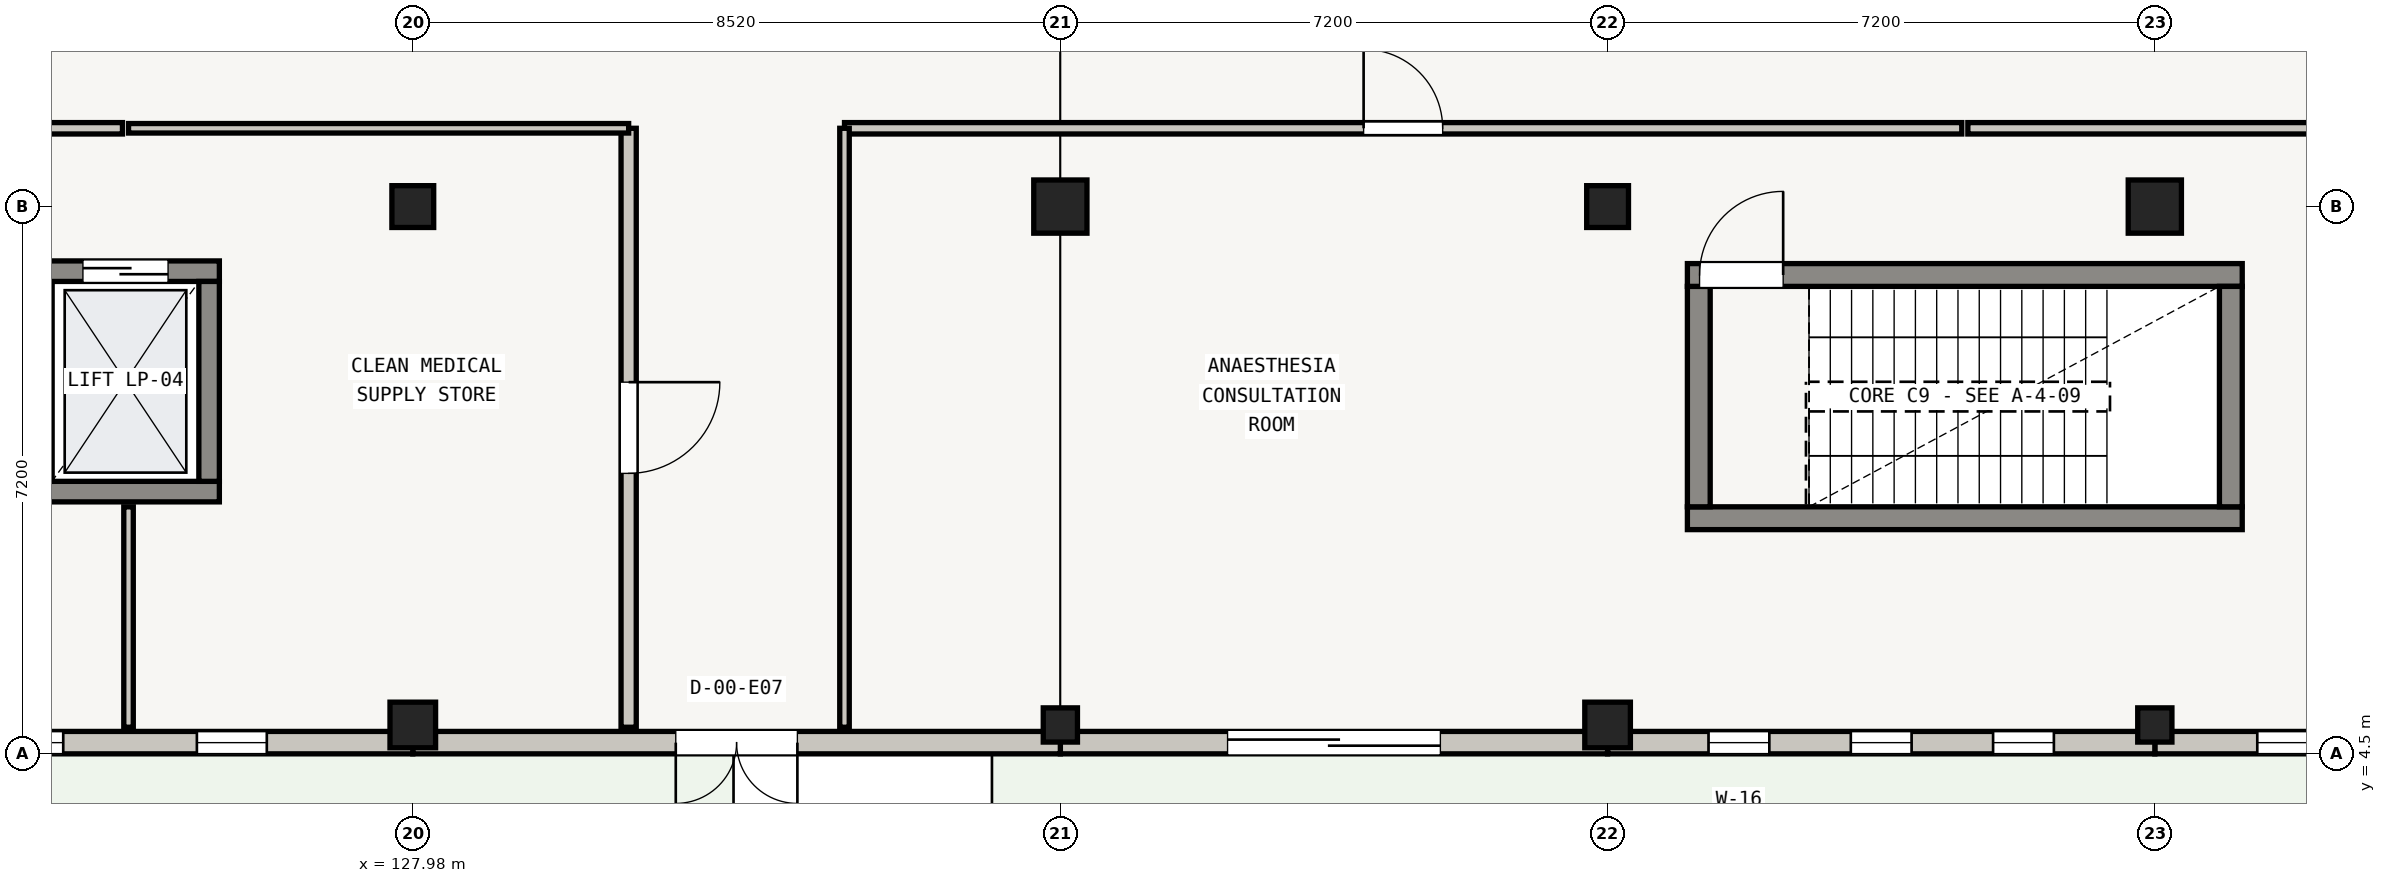
"""IFC4 building model, lengths in metres.
Left out: names, types, materials, properties, quantities, classifications, styles, units other than length and angle.
Written with IfcOpenShell. Run it as: python <this file> out.ifc"""

import sys

from ifc_helpers import new_model, si_unit, direction, frame, frame_2d, origin, origin_2d, place, context, subcontext, project, spatial, rectangle, extrude, element, fill, save


model = new_model("IFC4")
c1 = context("Model", 3, precision=1e-05, world=origin(), true_north=direction((0.0, 1.0)))
c2 = subcontext(c1, "Body", "Model", "MODEL_VIEW")
j1 = project(units=[si_unit("LENGTHUNIT", "METRE"), si_unit("PLANEANGLEUNIT", "RADIAN")], contexts=[c1])
p1 = place(None, origin())
s1 = spatial("IfcSite", under=j1, at=p1, CompositionType="ELEMENT")
p2 = place(p1, origin())
s2 = spatial("IfcBuilding", under=s1, at=p2, CompositionType="ELEMENT")
p3 = place(p2, origin())
s3 = spatial("IfcBuildingStorey", under=s2, at=p3, CompositionType="ELEMENT", Elevation=0.0)
p4 = place(p3, frame((127.98, 4.88, 0.0), z_axis=(0.0, 0.0, 1.0), x_axis=(1.0, 0.0, 0.0)))
e1 = element("IfcColumn", 1, at=p4, inside=s3, PredefinedType="COLUMN", context=c2, shape_type="SweptSolid", body=[
    extrude(rectangle(XDim=0.6, YDim=0.6, at=origin_2d()), origin(), (0.0, 0.0, 1.0), 4.205),
])
p5 = place(p3, frame((127.98, 11.7, 0.0), z_axis=(0.0, 0.0, 1.0), x_axis=(1.0, 0.0, 0.0)))
e2 = element("IfcColumn", 2, at=p5, inside=s3, PredefinedType="COLUMN", context=c2, shape_type="SweptSolid", body=[
    extrude(rectangle(XDim=0.55, YDim=0.55, at=origin_2d()), origin(), (0.0, 0.0, 1.0), 4.205),
])
p6 = place(p3, frame((136.5, 4.88, 0.0), z_axis=(0.0, 0.0, 1.0), x_axis=(1.0, 0.0, 0.0)))
e3 = element("IfcColumn", 3, at=p6, inside=s3, PredefinedType="COLUMN", context=c2, shape_type="SweptSolid", body=[
    extrude(rectangle(XDim=0.45, YDim=0.45, at=origin_2d()), origin(), (0.0, 0.0, 1.0), 4.205),
])
p7 = place(p3, frame((136.5, 11.7, 0.0), z_axis=(0.0, 0.0, 1.0), x_axis=(1.0, 0.0, 0.0)))
e4 = element("IfcColumn", 4, at=p7, inside=s3, PredefinedType="COLUMN", context=c2, shape_type="SweptSolid", body=[
    extrude(rectangle(XDim=0.7, YDim=0.7, at=origin_2d()), origin(), (0.0, 0.0, 1.0), 4.205),
])
p8 = place(p3, frame((143.7, 4.88, 0.0), z_axis=(0.0, 0.0, 1.0), x_axis=(1.0, 0.0, 0.0)))
e5 = element("IfcColumn", 5, at=p8, inside=s3, PredefinedType="COLUMN", context=c2, shape_type="SweptSolid", body=[
    extrude(rectangle(XDim=0.6, YDim=0.6, at=origin_2d()), origin(), (0.0, 0.0, 1.0), 4.205),
])
p9 = place(p3, frame((143.7, 11.7, 0.0), z_axis=(0.0, 0.0, 1.0), x_axis=(1.0, 0.0, 0.0)))
e6 = element("IfcColumn", 6, at=p9, inside=s3, PredefinedType="COLUMN", context=c2, shape_type="SweptSolid", body=[
    extrude(rectangle(XDim=0.55, YDim=0.55, at=origin_2d()), origin(), (0.0, 0.0, 1.0), 4.205),
])
p10 = place(p3, frame((150.9, 4.88, 0.0), z_axis=(0.0, 0.0, 1.0), x_axis=(1.0, 0.0, 0.0)))
e7 = element("IfcColumn", 7, at=p10, inside=s3, PredefinedType="COLUMN", context=c2, shape_type="SweptSolid", body=[
    extrude(rectangle(XDim=0.45, YDim=0.45, at=origin_2d()), origin(), (0.0, 0.0, 1.0), 4.205),
])
p11 = place(p3, frame((150.9, 11.7, 0.0), z_axis=(0.0, 0.0, 1.0), x_axis=(1.0, 0.0, 0.0)))
e8 = element("IfcColumn", 8, at=p11, inside=s3, PredefinedType="COLUMN", context=c2, shape_type="SweptSolid", body=[
    extrude(rectangle(XDim=0.7, YDim=0.7, at=origin_2d()), origin(), (0.0, 0.0, 1.0), 4.205),
])
p12 = place(p3, frame((158.1, 4.647, 0.0), z_axis=(0.0, 0.0, 1.0), x_axis=(-1.0, 0.0, 0.0)))
e9 = element("IfcWall", 9, at=p12, inside=s3, PredefinedType="STANDARD", context=c2, shape_type="SweptSolid", body=[
    extrude(rectangle(XDim=7.2, YDim=0.295, at=frame_2d((3.6, 0.0))), origin(), (0.0, 0.0, 1.0), 3.59),
])
p13 = place(p12, frame((1.348, 0.0, 0.55)))
e10 = element("IfcOpeningElement", 10, at=p13, cuts=e9, PredefinedType="OPENING", context=c2, shape_type="SweptSolid", body=[
    extrude(rectangle(XDim=0.76, YDim=2.16, at=frame_2d((0.38, 1.08))), frame((0.0, 0.147, 0.0), z_axis=(0.0, -1.0, 0.0), x_axis=(1.0, 0.0, 0.0)), (0.0, 0.0, 1.0), 0.295),
])
p14 = place(p12, frame((3.22, 0.0, 0.55)))
e11 = element("IfcOpeningElement", 11, at=p14, cuts=e9, PredefinedType="OPENING", context=c2, shape_type="SweptSolid", body=[
    extrude(rectangle(XDim=0.76, YDim=2.16, at=frame_2d((0.38, 1.08))), frame((0.0, 0.147, 0.0), z_axis=(0.0, -1.0, 0.0), x_axis=(1.0, 0.0, 0.0)), (0.0, 0.0, 1.0), 0.295),
])
p15 = place(p12, frame((5.092, 0.0, 0.55)))
e12 = element("IfcOpeningElement", 12, at=p15, cuts=e9, PredefinedType="OPENING", context=c2, shape_type="SweptSolid", body=[
    extrude(rectangle(XDim=0.76, YDim=2.16, at=frame_2d((0.38, 1.08))), frame((0.0, 0.147, 0.0), z_axis=(0.0, -1.0, 0.0), x_axis=(1.0, 0.0, 0.0)), (0.0, 0.0, 1.0), 0.295),
])
p16 = place(p3, frame((150.9, 4.647, 0.0), z_axis=(0.0, 0.0, 1.0), x_axis=(-1.0, 0.0, 0.0)))
e13 = element("IfcWall", 13, at=p16, inside=s3, PredefinedType="STANDARD", context=c2, shape_type="SweptSolid", body=[
    extrude(rectangle(XDim=7.2, YDim=0.295, at=frame_2d((3.6, 0.0))), origin(), (0.0, 0.0, 1.0), 3.59),
])
p17 = place(p16, frame((1.328, 0.0, 0.55)))
e14 = element("IfcOpeningElement", 14, at=p17, cuts=e13, PredefinedType="OPENING", context=c2, shape_type="SweptSolid", body=[
    extrude(rectangle(XDim=0.8, YDim=2.16, at=frame_2d((0.4, 1.08))), frame((0.0, 0.147, 0.0), z_axis=(0.0, -1.0, 0.0), x_axis=(1.0, 0.0, 0.0)), (0.0, 0.0, 1.0), 0.295),
])
p18 = place(p16, frame((3.2, 0.0, 0.55)))
e15 = element("IfcOpeningElement", 15, at=p18, cuts=e13, PredefinedType="OPENING", context=c2, shape_type="SweptSolid", body=[
    extrude(rectangle(XDim=0.8, YDim=2.16, at=frame_2d((0.4, 1.08))), frame((0.0, 0.147, 0.0), z_axis=(0.0, -1.0, 0.0), x_axis=(1.0, 0.0, 0.0)), (0.0, 0.0, 1.0), 0.295),
])
p19 = place(p16, frame((5.072, 0.0, 0.55)))
e16 = element("IfcOpeningElement", 16, at=p19, cuts=e13, PredefinedType="OPENING", context=c2, shape_type="SweptSolid", body=[
    extrude(rectangle(XDim=0.8, YDim=2.16, at=frame_2d((0.4, 1.08))), frame((0.0, 0.147, 0.0), z_axis=(0.0, -1.0, 0.0), x_axis=(1.0, 0.0, 0.0)), (0.0, 0.0, 1.0), 0.295),
])
p20 = place(p3, frame((143.7, 4.647, 0.0), z_axis=(0.0, 0.0, 1.0), x_axis=(-1.0, 0.0, 0.0)))
e17 = element("IfcWall", 17, at=p20, inside=s3, PredefinedType="STANDARD", context=c2, shape_type="SweptSolid", body=[
    extrude(rectangle(XDim=7.2, YDim=0.295, at=frame_2d((3.6, 0.0))), origin(), (0.0, 0.0, 1.0), 3.57),
])
p21 = place(p20, frame((2.2, 0.0, 0.0)))
e18 = element("IfcOpeningElement", 18, at=p21, cuts=e17, PredefinedType="OPENING", context=c2, shape_type="SweptSolid", body=[
    extrude(rectangle(XDim=2.8, YDim=2.15, at=frame_2d((1.4, 1.075))), frame((0.0, 0.147, 0.0), z_axis=(0.0, -1.0, 0.0), x_axis=(1.0, 0.0, 0.0)), (0.0, 0.0, 1.0), 0.295),
])
p22 = place(p3, frame((136.5, 4.647, 0.0), z_axis=(0.0, 0.0, 1.0), x_axis=(-1.0, 0.0, 0.0)))
e19 = element("IfcWall", 19, at=p22, inside=s3, PredefinedType="STANDARD", context=c2, shape_type="SweptSolid", body=[
    extrude(rectangle(XDim=8.52, YDim=0.295, at=frame_2d((4.26, 0.0))), origin(), (0.0, 0.0, 1.0), 3.57),
])
p23 = place(p22, frame((3.46, 0.0, 0.0)))
e20 = element("IfcOpeningElement", 20, at=p23, cuts=e19, PredefinedType="OPENING", context=c2, shape_type="SweptSolid", body=[
    extrude(rectangle(XDim=1.6, YDim=2.1, at=frame_2d((0.8, 1.05))), frame((0.0, 0.147, 0.0), z_axis=(0.0, -1.0, 0.0), x_axis=(1.0, 0.0, 0.0)), (0.0, 0.0, 1.0), 0.295),
])
p24 = place(p3, frame((127.98, 4.647, 0.0), z_axis=(0.0, 0.0, 1.0), x_axis=(-1.0, 0.0, 0.0)))
e21 = element("IfcWall", 21, at=p24, inside=s3, PredefinedType="STANDARD", context=c2, shape_type="SweptSolid", body=[
    extrude(rectangle(XDim=7.44, YDim=0.295, at=frame_2d((3.72, 0.0))), origin(), (0.0, 0.0, 1.0), 3.57),
])
p25 = place(p24, frame((1.921, 0.0, 0.55)))
e22 = element("IfcOpeningElement", 22, at=p25, cuts=e21, PredefinedType="OPENING", context=c2, shape_type="SweptSolid", body=[
    extrude(rectangle(XDim=0.92, YDim=2.1, at=frame_2d((0.46, 1.05))), frame((0.0, 0.147, 0.0), z_axis=(0.0, -1.0, 0.0), x_axis=(1.0, 0.0, 0.0)), (0.0, 0.0, 1.0), 0.295),
])
p26 = place(p24, frame((4.599, 0.0, 0.55)))
e23 = element("IfcOpeningElement", 23, at=p26, cuts=e21, PredefinedType="OPENING", context=c2, shape_type="SweptSolid", body=[
    extrude(rectangle(XDim=0.92, YDim=2.1, at=frame_2d((0.46, 1.05))), frame((0.0, 0.147, 0.0), z_axis=(0.0, -1.0, 0.0), x_axis=(1.0, 0.0, 0.0)), (0.0, 0.0, 1.0), 0.295),
])
p27 = place(p3, frame((125.435, 7.95, 0.0), z_axis=(0.0, 0.0, 1.0), x_axis=(-1.0, 0.0, 0.0)))
e24 = element("IfcWall", 24, at=p27, inside=s3, PredefinedType="SHEAR", context=c2, shape_type="SweptSolid", body=[
    extrude(rectangle(XDim=2.47, YDim=0.27, at=frame_2d((1.235, 0.0))), origin(), (0.0, 0.0, 1.0), 4.205),
])
p28 = place(p3, frame((122.965, 10.85, 0.0), z_axis=(0.0, 0.0, 1.0), x_axis=(1.0, 0.0, 0.0)))
e25 = element("IfcWall", 25, at=p28, inside=s3, PredefinedType="SHEAR", context=c2, shape_type="SweptSolid", body=[
    extrude(rectangle(XDim=2.47, YDim=0.27, at=frame_2d((1.235, 0.0))), origin(), (0.0, 0.0, 1.0), 4.205),
])
p29 = place(p28, frame((0.675, 0.0, 0.0)))
e26 = element("IfcOpeningElement", 26, at=p29, cuts=e25, PredefinedType="OPENING", context=c2, shape_type="SweptSolid", body=[
    extrude(rectangle(XDim=1.12, YDim=2.1, at=frame_2d((0.56, 1.05))), frame((0.0, 0.135, 0.0), z_axis=(0.0, -1.0, 0.0), x_axis=(1.0, 0.0, 0.0)), (0.0, 0.0, 1.0), 0.27),
])
p30 = place(p3, frame((125.3, 10.715, 0.0), z_axis=(0.0, 0.0, 1.0), x_axis=(0.0, -1.0, 0.0)))
e27 = element("IfcWall", 27, at=p30, inside=s3, PredefinedType="SHEAR", context=c2, shape_type="SweptSolid", body=[
    extrude(rectangle(XDim=2.63, YDim=0.27, at=frame_2d((1.315, 0.0))), origin(), (0.0, 0.0, 1.0), 4.205),
])
p31 = place(p3, frame((152.05, 7.6, 0.0), z_axis=(0.0, 0.0, 1.0), x_axis=(-1.0, 0.0, 0.0)))
e28 = element("IfcWall", 28, at=p31, inside=s3, PredefinedType="SHEAR", context=c2, shape_type="SweptSolid", body=[
    extrude(rectangle(XDim=7.3, YDim=0.3, at=frame_2d((3.65, 0.0))), origin(), (0.0, 0.0, 1.0), 4.205),
])
p32 = place(p3, frame((144.9, 7.75, 0.0), z_axis=(0.0, 0.0, 1.0), x_axis=(0.0, 1.0, 0.0)))
e29 = element("IfcWall", 29, at=p32, inside=s3, PredefinedType="SHEAR", context=c2, shape_type="SweptSolid", body=[
    extrude(rectangle(XDim=2.9, YDim=0.3, at=frame_2d((1.45, 0.0))), origin(), (0.0, 0.0, 1.0), 4.205),
])
p33 = place(p3, frame((144.75, 10.8, 0.0), z_axis=(0.0, 0.0, 1.0), x_axis=(1.0, 0.0, 0.0)))
e30 = element("IfcWall", 30, at=p33, inside=s3, PredefinedType="SHEAR", context=c2, shape_type="SweptSolid", body=[
    extrude(rectangle(XDim=7.3, YDim=0.3, at=frame_2d((3.65, 0.0))), origin(), (0.0, 0.0, 1.0), 4.205),
])
p34 = place(p33, frame((0.16, 0.0, 0.0)))
e31 = element("IfcOpeningElement", 31, at=p34, cuts=e30, PredefinedType="OPENING", context=c2, shape_type="SweptSolid", body=[
    extrude(rectangle(XDim=1.1, YDim=2.05, at=frame_2d((0.55, 1.025))), frame((0.0, 0.15, 0.0), z_axis=(0.0, -1.0, 0.0), x_axis=(1.0, 0.0, 0.0)), (0.0, 0.0, 1.0), 0.3),
])
p35 = place(p3, frame((151.9, 10.65, 0.0), z_axis=(0.0, 0.0, 1.0), x_axis=(0.0, -1.0, 0.0)))
e32 = element("IfcWall", 32, at=p35, inside=s3, PredefinedType="SHEAR", context=c2, shape_type="SweptSolid", body=[
    extrude(rectangle(XDim=2.9, YDim=0.3, at=frame_2d((1.45, 0.0))), origin(), (0.0, 0.0, 1.0), 4.205),
])
p36 = place(p3, frame((148.44, 12.73, 0.0), z_axis=(0.0, 0.0, 1.0), x_axis=(1.0, 0.0, 0.0)))
e33 = element("IfcWall", 33, at=p36, inside=s3, PredefinedType="PARTITIONING", context=c2, shape_type="SweptSolid", body=[
    extrude(rectangle(XDim=16.51, YDim=0.15, at=frame_2d((8.255, 0.0))), origin(), (0.0, 0.0, 1.0), 3.225),
])
p37 = place(p36, frame((7.755, 0.0, 0.0)))
e34 = element("IfcOpeningElement", 34, at=p37, cuts=e33, PredefinedType="OPENING", context=c2, shape_type="SweptSolid", body=[
    extrude(rectangle(XDim=1.0, YDim=2.05, at=frame_2d((0.5, 1.025))), frame((0.0, 0.075, 0.0), z_axis=(0.0, -1.0, 0.0), x_axis=(1.0, 0.0, 0.0)), (0.0, 0.0, 1.0), 0.15),
])
p38 = place(p3, frame((133.66, 12.73, 0.0), z_axis=(0.0, 0.0, 1.0), x_axis=(1.0, 0.0, 0.0)))
e35 = element("IfcWall", 35, at=p38, inside=s3, PredefinedType="PARTITIONING", context=c2, shape_type="SweptSolid", body=[
    extrude(rectangle(XDim=14.7, YDim=0.15, at=frame_2d((7.35, 0.0))), origin(), (0.0, 0.0, 1.0), 3.225),
])
p39 = place(p38, frame((6.83, 0.0, 0.0)))
e36 = element("IfcOpeningElement", 36, at=p39, cuts=e35, PredefinedType="OPENING", context=c2, shape_type="SweptSolid", body=[
    extrude(rectangle(XDim=1.04, YDim=2.05, at=frame_2d((0.52, 1.025))), frame((0.0, 0.075, 0.0), z_axis=(0.0, -1.0, 0.0), x_axis=(1.0, 0.0, 0.0)), (0.0, 0.0, 1.0), 0.15),
])
p40 = place(p3, frame((133.66, 4.85, 0.0), z_axis=(0.0, 0.0, 1.0), x_axis=(0.0, 1.0, 0.0)))
e37 = element("IfcWall", 37, at=p40, inside=s3, PredefinedType="PARTITIONING", context=c2, shape_type="SweptSolid", body=[
    extrude(rectangle(XDim=7.88, YDim=0.125, at=frame_2d((3.94, 0.0))), origin(), (0.0, 0.0, 1.0), 3.225),
])
p41 = place(p3, frame((130.82, 12.73, 0.0), z_axis=(0.0, 0.0, 1.0), x_axis=(0.0, -1.0, 0.0)))
e38 = element("IfcWall", 38, at=p41, inside=s3, PredefinedType="SOLIDWALL", context=c2, shape_type="SweptSolid", body=[
    extrude(rectangle(XDim=7.88, YDim=0.2, at=frame_2d((3.94, 0.0))), origin(), (0.0, 0.0, 1.0), 3.225),
])
p42 = place(p41, frame((3.34, 0.0, 0.0)))
e39 = element("IfcOpeningElement", 39, at=p42, cuts=e38, PredefinedType="OPENING", context=c2, shape_type="SweptSolid", body=[
    extrude(rectangle(XDim=1.2, YDim=2.05, at=frame_2d((0.6, 1.025))), frame((0.0, 0.1, 0.0), z_axis=(0.0, -1.0, 0.0), x_axis=(1.0, 0.0, 0.0)), (0.0, 0.0, 1.0), 0.2),
])
p43 = place(p3, frame((124.24, 4.85, 0.0), z_axis=(0.0, 0.0, 1.0), x_axis=(0.0, 1.0, 0.0)))
e40 = element("IfcWall", 40, at=p43, inside=s3, PredefinedType="PARTITIONING", context=c2, shape_type="SweptSolid", body=[
    extrude(rectangle(XDim=2.9, YDim=0.125, at=frame_2d((1.45, 0.0))), origin(), (0.0, 0.0, 1.0), 3.225),
])
p44 = place(p3, frame((124.24, 12.73, 0.0), z_axis=(0.0, 0.0, 1.0), x_axis=(1.0, 0.0, 0.0)))
e41 = element("IfcWall", 41, at=p44, inside=s3, PredefinedType="PARTITIONING", context=c2, shape_type="SweptSolid", body=[
    extrude(rectangle(XDim=6.58, YDim=0.125, at=frame_2d((3.29, 0.0))), origin(), (0.0, 0.0, 1.0), 3.225),
])
p45 = place(p3, frame((117.84, 12.73, 0.0), z_axis=(0.0, 0.0, 1.0), x_axis=(1.0, 0.0, 0.0)))
e42 = element("IfcWall", 42, at=p45, inside=s3, PredefinedType="PARTITIONING", context=c2, shape_type="SweptSolid", body=[
    extrude(rectangle(XDim=6.32, YDim=0.15, at=frame_2d((3.16, 0.0))), origin(), (0.0, 0.0, 1.0), 3.225),
])
p46 = place(p45, frame((3.458, 0.0, 0.0)))
e43 = element("IfcOpeningElement", 43, at=p46, cuts=e42, PredefinedType="OPENING", context=c2, shape_type="SweptSolid", body=[
    extrude(rectangle(XDim=1.0, YDim=2.05, at=frame_2d((0.5, 1.025))), frame((0.0, 0.075, 0.0), z_axis=(0.0, -1.0, 0.0), x_axis=(1.0, 0.0, 0.0)), (0.0, 0.0, 1.0), 0.15),
])
p47 = place(p15, origin())
e44 = element("IfcWindow", 44, at=p47, inside=s3, PartitioningType="SINGLE_PANEL", PredefinedType="WINDOW", context=c2, shape_type="SweptSolid", body=[
    extrude(rectangle(XDim=0.76, YDim=2.16, at=frame_2d((0.38, 1.08))), frame((0.0, 0.03, 0.0), z_axis=(0.0, -1.0, 0.0), x_axis=(1.0, 0.0, 0.0)), (0.0, 0.0, 1.0), 0.06),
])
fill(e12, e44)
p48 = place(p17, origin())
e45 = element("IfcWindow", 45, at=p48, inside=s3, PartitioningType="SINGLE_PANEL", PredefinedType="WINDOW", context=c2, shape_type="SweptSolid", body=[
    extrude(rectangle(XDim=0.8, YDim=2.16, at=frame_2d((0.4, 1.08))), frame((0.0, 0.03, 0.0), z_axis=(0.0, -1.0, 0.0), x_axis=(1.0, 0.0, 0.0)), (0.0, 0.0, 1.0), 0.06),
])
fill(e14, e45)
p49 = place(p18, origin())
e46 = element("IfcWindow", 46, at=p49, inside=s3, PartitioningType="SINGLE_PANEL", PredefinedType="WINDOW", context=c2, shape_type="SweptSolid", body=[
    extrude(rectangle(XDim=0.8, YDim=2.16, at=frame_2d((0.4, 1.08))), frame((0.0, 0.03, 0.0), z_axis=(0.0, -1.0, 0.0), x_axis=(1.0, 0.0, 0.0)), (0.0, 0.0, 1.0), 0.06),
])
fill(e15, e46)
p50 = place(p19, origin())
e47 = element("IfcWindow", 47, at=p50, inside=s3, PartitioningType="SINGLE_PANEL", PredefinedType="WINDOW", context=c2, shape_type="SweptSolid", body=[
    extrude(rectangle(XDim=0.8, YDim=2.16, at=frame_2d((0.4, 1.08))), frame((0.0, 0.03, 0.0), z_axis=(0.0, -1.0, 0.0), x_axis=(1.0, 0.0, 0.0)), (0.0, 0.0, 1.0), 0.06),
])
fill(e16, e47)
p51 = place(p21, origin())
e48 = element("IfcDoor", 48, at=p51, inside=s3, OperationType="ROLLINGUP", PredefinedType="GATE", context=c2, shape_type="SweptSolid", body=[
    extrude(rectangle(XDim=2.8, YDim=2.15, at=frame_2d((1.4, 1.075))), frame((0.0, 0.025, 0.0), z_axis=(0.0, -1.0, 0.0), x_axis=(1.0, 0.0, 0.0)), (0.0, 0.0, 1.0), 0.05),
])
fill(e18, e48)
p52 = place(p23, origin())
e49 = element("IfcDoor", 49, at=p52, inside=s3, OperationType="DOUBLE_DOOR_SINGLE_SWING", PredefinedType="DOOR", context=c2, shape_type="SweptSolid", body=[
    extrude(rectangle(XDim=1.6, YDim=2.1, at=frame_2d((0.8, 1.05))), frame((0.0, 0.025, 0.0), z_axis=(0.0, -1.0, 0.0), x_axis=(1.0, 0.0, 0.0)), (0.0, 0.0, 1.0), 0.05),
])
fill(e20, e49)
p53 = place(p25, origin())
e50 = element("IfcWindow", 50, at=p53, inside=s3, PartitioningType="DOUBLE_PANEL_VERTICAL", PredefinedType="WINDOW", context=c2, shape_type="SweptSolid", body=[
    extrude(rectangle(XDim=0.92, YDim=2.1, at=frame_2d((0.46, 1.05))), frame((0.0, 0.03, 0.0), z_axis=(0.0, -1.0, 0.0), x_axis=(1.0, 0.0, 0.0)), (0.0, 0.0, 1.0), 0.06),
])
fill(e22, e50)
p54 = place(p26, origin())
e51 = element("IfcWindow", 51, at=p54, inside=s3, PartitioningType="DOUBLE_PANEL_VERTICAL", PredefinedType="WINDOW", context=c2, shape_type="SweptSolid", body=[
    extrude(rectangle(XDim=0.92, YDim=2.1, at=frame_2d((0.46, 1.05))), frame((0.0, 0.03, 0.0), z_axis=(0.0, -1.0, 0.0), x_axis=(1.0, 0.0, 0.0)), (0.0, 0.0, 1.0), 0.06),
])
fill(e23, e51)
p55 = place(p29, origin())
e52 = element("IfcDoor", 52, at=p55, inside=s3, OperationType="DOUBLE_DOOR_SLIDING", PredefinedType="DOOR", context=c2, shape_type="SweptSolid", body=[
    extrude(rectangle(XDim=1.12, YDim=2.1, at=frame_2d((0.56, 1.05))), frame((0.0, 0.025, 0.0), z_axis=(0.0, -1.0, 0.0), x_axis=(1.0, 0.0, 0.0)), (0.0, 0.0, 1.0), 0.05),
])
fill(e26, e52)
p56 = place(p34, origin())
e53 = element("IfcDoor", 53, at=p56, inside=s3, OperationType="SINGLE_SWING_RIGHT", PredefinedType="DOOR", context=c2, shape_type="SweptSolid", body=[
    extrude(rectangle(XDim=1.1, YDim=2.05, at=frame_2d((0.55, 1.025))), frame((0.0, 0.025, 0.0), z_axis=(0.0, -1.0, 0.0), x_axis=(1.0, 0.0, 0.0)), (0.0, 0.0, 1.0), 0.05),
])
fill(e31, e53)
p57 = place(p39, origin())
e54 = element("IfcDoor", 54, at=p57, inside=s3, OperationType="SINGLE_SWING_LEFT", PredefinedType="DOOR", context=c2, shape_type="SweptSolid", body=[
    extrude(rectangle(XDim=1.04, YDim=2.05, at=frame_2d((0.52, 1.025))), frame((0.0, 0.025, 0.0), z_axis=(0.0, -1.0, 0.0), x_axis=(1.0, 0.0, 0.0)), (0.0, 0.0, 1.0), 0.05),
])
fill(e36, e54)
p58 = place(p42, origin())
e55 = element("IfcDoor", 55, at=p58, inside=s3, OperationType="SINGLE_SWING_LEFT", PredefinedType="DOOR", context=c2, shape_type="SweptSolid", body=[
    extrude(rectangle(XDim=1.2, YDim=2.05, at=frame_2d((0.6, 1.025))), frame((0.0, 0.025, 0.0), z_axis=(0.0, -1.0, 0.0), x_axis=(1.0, 0.0, 0.0)), (0.0, 0.0, 1.0), 0.05),
])
fill(e39, e55)
save(model, sys.argv[1])
